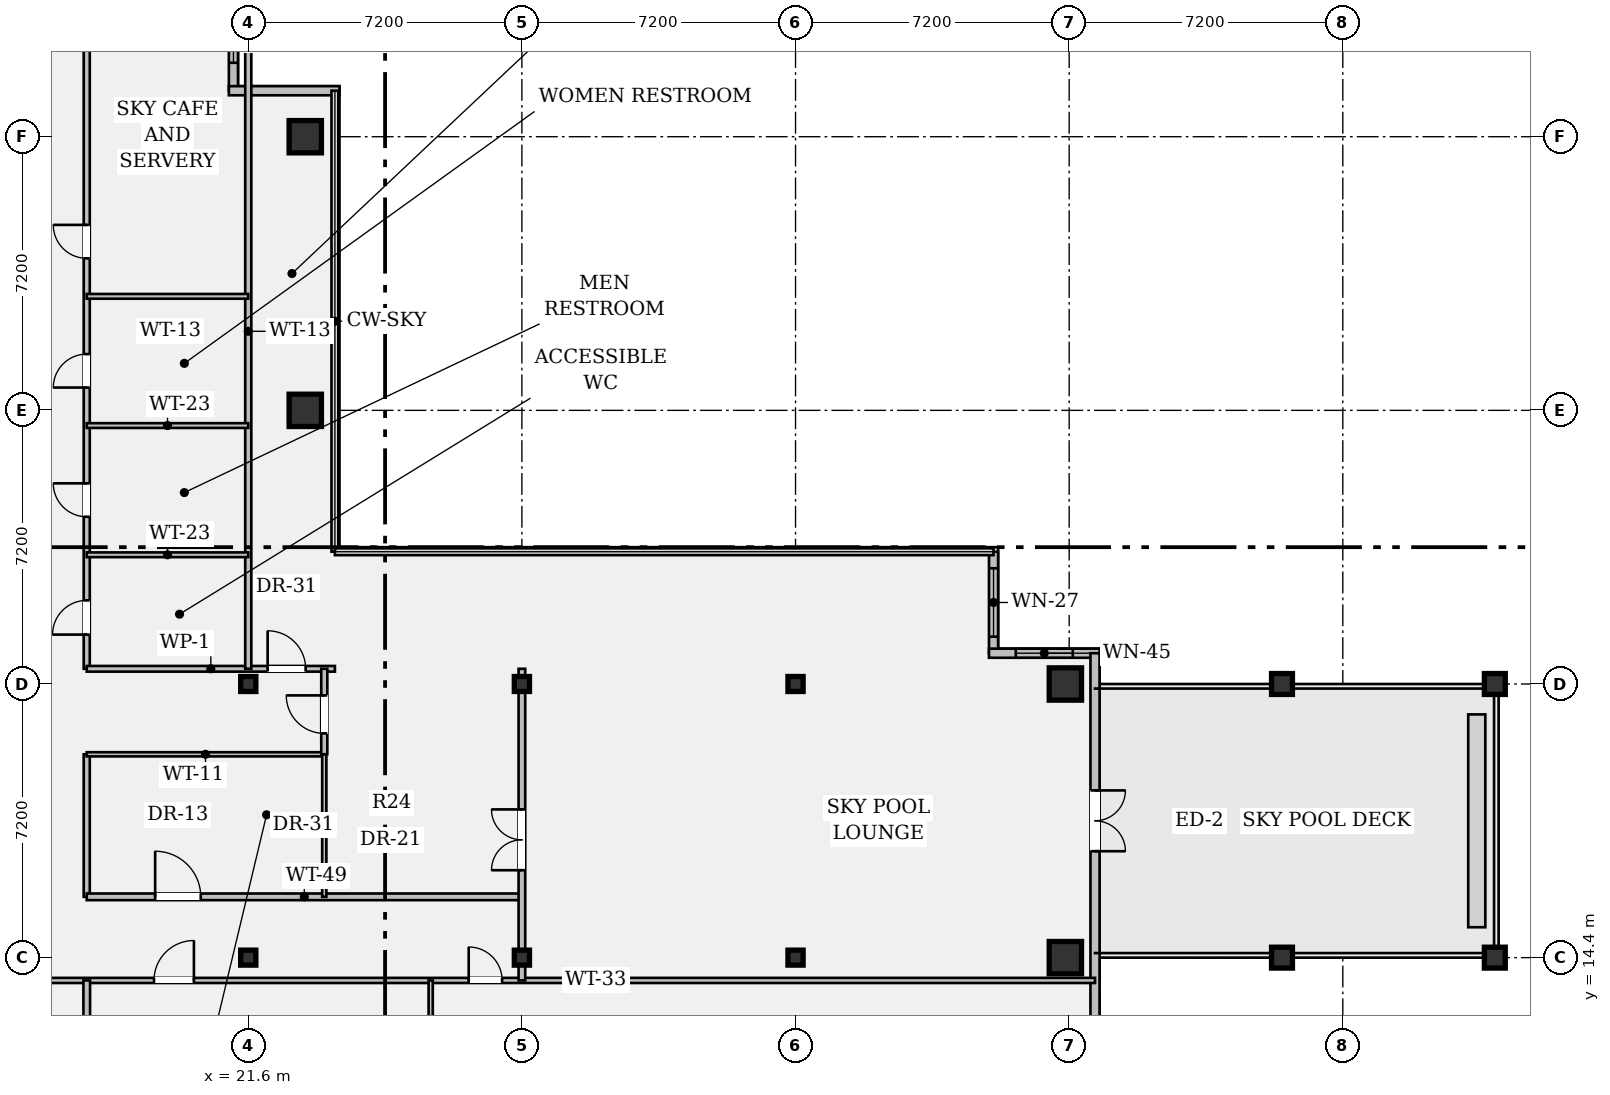
"""IFC4 building model, lengths in metres.
Left out: names, types, materials, properties, quantities, classifications, styles, units other than length and angle.
Written with IfcOpenShell. Run it as: python <this file> out.ifc"""

import sys

from ifc_helpers import new_model, si_unit, direction, frame, frame_2d, origin, origin_2d, place, context, subcontext, project, spatial, rectangle, hollow_rectangle, i_section, extrude, element, fill, save


model = new_model("IFC4")
c1 = context("Model", 3, precision=1e-05, world=origin(), true_north=direction((0.0, 1.0)))
c2 = subcontext(c1, "Body", "Model", "MODEL_VIEW")
j1 = project(units=[si_unit("LENGTHUNIT", "METRE"), si_unit("PLANEANGLEUNIT", "RADIAN")], contexts=[c1])
p1 = place(None, origin())
s1 = spatial("IfcSite", under=j1, at=p1, CompositionType="ELEMENT")
p2 = place(p1, origin())
s2 = spatial("IfcBuilding", under=s1, at=p2, CompositionType="ELEMENT")
p3 = place(p2, frame((0.0, 0.0, 168.7)))
s3 = spatial("IfcBuildingStorey", under=s2, at=p3, CompositionType="ELEMENT", Elevation=168.7)
for number, where, z_axis, x_axis in (
    (1, (21.6, 14.4, 0.0), (0.0, 0.0, 1.0), (1.0, 0.0, 0.0)),
    (2, (21.6, 21.6, 0.0), (0.0, 0.0, 1.0), (1.0, 0.0, 0.0)),
):
    element("IfcColumn", number, at=place(p3, frame(where, z_axis=z_axis, x_axis=x_axis)), inside=s3, PredefinedType="COLUMN", context=c2, shape_type="SweptSolid", body=[
        extrude(i_section(OverallWidth=0.399, OverallDepth=0.394, WebThickness=0.023, FlangeThickness=0.037, FilletRadius=0.018, at=origin_2d()), origin(), (0.0, 0.0, 1.0), 4.29),
    ])
for number, where, z_axis, x_axis in (
    (3, (23.1, 28.8, 0.0), (0.0, 0.0, 1.0), (1.0, 0.0, 0.0)),
    (4, (23.1, 36.0, 0.0), (0.0, 0.0, 1.0), (1.0, 0.0, 0.0)),
):
    element("IfcColumn", number, at=place(p3, frame(where, z_axis=z_axis, x_axis=x_axis)), inside=s3, PredefinedType="COLUMN", context=c2, shape_type="SweptSolid", body=[
        extrude(hollow_rectangle(XDim=0.85, YDim=0.85, WallThickness=0.05, at=origin_2d()), origin(), (0.0, 0.0, 1.0), 4.29),
    ])
for number, where, z_axis, x_axis in (
    (5, (28.8, 14.4, 0.0), (0.0, 0.0, 1.0), (1.0, 0.0, 0.0)),
    (6, (28.8, 21.6, 0.0), (0.0, 0.0, 1.0), (1.0, 0.0, 0.0)),
    (7, (36.0, 14.4, 0.0), (0.0, 0.0, 1.0), (1.0, 0.0, 0.0)),
    (8, (36.0, 21.6, 0.0), (0.0, 0.0, 1.0), (1.0, 0.0, 0.0)),
):
    element("IfcColumn", number, at=place(p3, frame(where, z_axis=z_axis, x_axis=x_axis)), inside=s3, PredefinedType="COLUMN", context=c2, shape_type="SweptSolid", body=[
        extrude(i_section(OverallWidth=0.399, OverallDepth=0.394, WebThickness=0.023, FlangeThickness=0.037, FilletRadius=0.018, at=origin_2d()), origin(), (0.0, 0.0, 1.0), 4.29),
    ])
for number, where, z_axis, x_axis in (
    (9, (43.1, 14.4, 0.0), (0.0, 0.0, 1.0), (1.0, 0.0, 0.0)),
    (10, (43.1, 21.6, 0.0), (0.0, 0.0, 1.0), (1.0, 0.0, 0.0)),
):
    element("IfcColumn", number, at=place(p3, frame(where, z_axis=z_axis, x_axis=x_axis)), inside=s3, PredefinedType="COLUMN", context=c2, shape_type="SweptSolid", body=[
        extrude(hollow_rectangle(XDim=0.85, YDim=0.85, WallThickness=0.05, at=origin_2d()), origin(), (0.0, 0.0, 1.0), 4.29),
    ])
for number, where, z_axis, x_axis in (
    (11, (48.8, 14.4, -0.345), (0.0, 0.0, 1.0), (1.0, 0.0, 0.0)),
    (12, (54.4, 14.4, -0.345), (0.0, 0.0, 1.0), (1.0, 0.0, 0.0)),
    (13, (48.8, 21.6, -0.345), (0.0, 0.0, 1.0), (1.0, 0.0, 0.0)),
    (14, (54.4, 21.6, -0.345), (0.0, 0.0, 1.0), (1.0, 0.0, 0.0)),
):
    element("IfcColumn", number, at=place(p3, frame(where, z_axis=z_axis, x_axis=x_axis)), inside=s3, PredefinedType="COLUMN", context=c2, shape_type="SweptSolid", body=[
        extrude(hollow_rectangle(XDim=0.55, YDim=0.55, WallThickness=0.035, at=origin_2d()), origin(), (0.0, 0.0, 1.0), 3.23),
    ])
p4 = place(p3, frame((21.21, 39.88, 0.0), z_axis=(0.0, 0.0, 1.0), x_axis=(0.0, -1.0, 0.0)))
e15 = element("IfcWall", 15, at=p4, inside=s3, PredefinedType="STANDARD", context=c2, shape_type="SweptSolid", body=[
    extrude(rectangle(XDim=2.67, YDim=0.24, at=frame_2d((1.335, 0.0))), origin(), (0.0, 0.0, 1.0), 4.29),
])
p5 = place(p4, frame((0.735, 0.0, 0.95)))
e16 = element("IfcOpeningElement", 16, at=p5, cuts=e15, PredefinedType="OPENING", context=c2, shape_type="SweptSolid", body=[
    extrude(rectangle(XDim=1.2, YDim=1.8, at=frame_2d((0.6, 0.9))), frame((0.0, 0.132, 0.0), z_axis=(0.0, -1.0, 0.0), x_axis=(1.0, 0.0, 0.0)), (0.0, 0.0, 1.0), 0.264),
])
p6 = place(p3, frame((21.09, 37.21, 0.0), z_axis=(0.0, 0.0, 1.0), x_axis=(1.0, 0.0, 0.0)))
e17 = element("IfcWall", 17, at=p6, inside=s3, PredefinedType="STANDARD", context=c2, shape_type="SweptSolid", body=[
    extrude(rectangle(XDim=2.91, YDim=0.24, at=frame_2d((1.455, 0.0))), origin(), (0.0, 0.0, 1.0), 4.29),
])
p7 = place(p3, frame((41.21, 25.08, 0.0), z_axis=(0.0, 0.0, 1.0), x_axis=(0.0, -1.0, 0.0)))
e18 = element("IfcWall", 18, at=p7, inside=s3, PredefinedType="STANDARD", context=c2, shape_type="SweptSolid", body=[
    extrude(rectangle(XDim=2.67, YDim=0.24, at=frame_2d((1.335, 0.0))), origin(), (0.0, 0.0, 1.0), 4.29),
])
p8 = place(p7, frame((0.435, 0.0, 0.95)))
e19 = element("IfcOpeningElement", 19, at=p8, cuts=e18, PredefinedType="OPENING", context=c2, shape_type="SweptSolid", body=[
    extrude(rectangle(XDim=1.8, YDim=1.35, at=frame_2d((0.9, 0.675))), frame((0.0, 0.132, 0.0), z_axis=(0.0, -1.0, 0.0), x_axis=(1.0, 0.0, 0.0)), (0.0, 0.0, 1.0), 0.264),
])
p9 = place(p3, frame((41.09, 22.41, 0.0), z_axis=(0.0, 0.0, 1.0), x_axis=(1.0, 0.0, 0.0)))
e20 = element("IfcWall", 20, at=p9, inside=s3, PredefinedType="STANDARD", context=c2, shape_type="SweptSolid", body=[
    extrude(rectangle(XDim=2.91, YDim=0.24, at=frame_2d((1.455, 0.0))), origin(), (0.0, 0.0, 1.0), 4.29),
])
p10 = place(p9, frame((0.705, 0.0, 0.95)))
e21 = element("IfcOpeningElement", 21, at=p10, cuts=e20, PredefinedType="OPENING", context=c2, shape_type="SweptSolid", body=[
    extrude(rectangle(XDim=1.5, YDim=1.8, at=frame_2d((0.75, 0.9))), frame((0.0, 0.132, 0.0), z_axis=(0.0, -1.0, 0.0), x_axis=(1.0, 0.0, 0.0)), (0.0, 0.0, 1.0), 0.264),
])
p11 = place(p3, frame((43.88, 22.41, 0.0), z_axis=(0.0, 0.0, 1.0), x_axis=(0.0, -1.0, 0.0)))
e22 = element("IfcWall", 22, at=p11, inside=s3, PredefinedType="STANDARD", context=c2, shape_type="SweptSolid", body=[
    extrude(rectangle(XDim=16.42, YDim=0.24, at=frame_2d((8.21, 0.0))), origin(), (0.0, 0.0, 1.0), 2.875),
])
p12 = place(p11, frame((3.61, 0.0, 0.0)))
e23 = element("IfcOpeningElement", 23, at=p12, cuts=e22, PredefinedType="OPENING", context=c2, shape_type="SweptSolid", body=[
    extrude(rectangle(XDim=1.6, YDim=2.2, at=frame_2d((0.8, 1.1))), frame((0.0, 0.132, 0.0), z_axis=(0.0, -1.0, 0.0), x_axis=(1.0, 0.0, 0.0)), (0.0, 0.0, 1.0), 0.264),
])
p13 = place(p3, frame((17.35, 22.0, 0.0), z_axis=(0.0, 0.0, 1.0), x_axis=(0.0, 1.0, 0.0)))
e24 = element("IfcWall", 24, at=p13, inside=s3, PredefinedType="PARTITIONING", context=c2, shape_type="SweptSolid", body=[
    extrude(rectangle(XDim=17.76, YDim=0.16, at=frame_2d((8.88, 0.0))), origin(), (0.0, 0.0, 1.0), 3.653),
])
p14 = place(p13, frame((0.9, 0.0, 0.0)))
e25 = element("IfcOpeningElement", 25, at=p14, cuts=e24, PredefinedType="OPENING", context=c2, shape_type="SweptSolid", body=[
    extrude(rectangle(XDim=0.9, YDim=2.15, at=frame_2d((0.45, 1.075))), frame((0.0, 0.092, 0.0), z_axis=(0.0, -1.0, 0.0), x_axis=(1.0, 0.0, 0.0)), (0.0, 0.0, 1.0), 0.184),
])
p15 = place(p13, frame((4.0, 0.0, 0.0)))
e26 = element("IfcOpeningElement", 26, at=p15, cuts=e24, PredefinedType="OPENING", context=c2, shape_type="SweptSolid", body=[
    extrude(rectangle(XDim=0.88, YDim=2.15, at=frame_2d((0.44, 1.075))), frame((0.0, 0.092, 0.0), z_axis=(0.0, -1.0, 0.0), x_axis=(1.0, 0.0, 0.0)), (0.0, 0.0, 1.0), 0.184),
])
p16 = place(p13, frame((7.4, 0.0, 0.0)))
e27 = element("IfcOpeningElement", 27, at=p16, cuts=e24, PredefinedType="OPENING", context=c2, shape_type="SweptSolid", body=[
    extrude(rectangle(XDim=0.88, YDim=2.15, at=frame_2d((0.44, 1.075))), frame((0.0, 0.092, 0.0), z_axis=(0.0, -1.0, 0.0), x_axis=(1.0, 0.0, 0.0)), (0.0, 0.0, 1.0), 0.184),
])
p17 = place(p13, frame((10.8, 0.0, 0.0)))
e28 = element("IfcOpeningElement", 28, at=p17, cuts=e24, PredefinedType="OPENING", context=c2, shape_type="SweptSolid", body=[
    extrude(rectangle(XDim=0.88, YDim=2.15, at=frame_2d((0.44, 1.075))), frame((0.0, 0.092, 0.0), z_axis=(0.0, -1.0, 0.0), x_axis=(1.0, 0.0, 0.0)), (0.0, 0.0, 1.0), 0.184),
])
p18 = place(p3, frame((17.35, 22.0, 0.0), z_axis=(0.0, 0.0, 1.0), x_axis=(1.0, 0.0, 0.0)))
e29 = element("IfcWall", 29, at=p18, inside=s3, PredefinedType="PARTITIONING", context=c2, shape_type="SweptSolid", body=[
    extrude(rectangle(XDim=6.53, YDim=0.15, at=frame_2d((3.265, 0.0))), origin(), (0.0, 0.0, 1.0), 3.858),
])
p19 = place(p18, frame((4.76, 0.0, 0.0)))
e30 = element("IfcOpeningElement", 30, at=p19, cuts=e29, PredefinedType="OPENING", context=c2, shape_type="SweptSolid", body=[
    extrude(rectangle(XDim=1.0, YDim=2.15, at=frame_2d((0.5, 1.075))), frame((0.0, 0.087, 0.0), z_axis=(0.0, -1.0, 0.0), x_axis=(1.0, 0.0, 0.0)), (0.0, 0.0, 1.0), 0.174),
])
p20 = place(p3, frame((14.4, 13.8, 0.0), z_axis=(0.0, 0.0, 1.0), x_axis=(1.0, 0.0, 0.0)))
e31 = element("IfcWall", 31, at=p20, inside=s3, PredefinedType="PARTITIONING", context=c2, shape_type="SweptSolid", body=[
    extrude(rectangle(XDim=29.48, YDim=0.135, at=frame_2d((14.74, 0.0))), origin(), (0.0, 0.0, 1.0), 3.653),
])
p21 = place(p20, frame((4.72, 0.0, 0.0)))
e32 = element("IfcOpeningElement", 32, at=p21, cuts=e31, PredefinedType="OPENING", context=c2, shape_type="SweptSolid", body=[
    extrude(rectangle(XDim=1.05, YDim=2.15, at=frame_2d((0.525, 1.075))), frame((0.0, 0.08, 0.0), z_axis=(0.0, -1.0, 0.0), x_axis=(1.0, 0.0, 0.0)), (0.0, 0.0, 1.0), 0.159),
])
p22 = place(p20, frame((13.0, 0.0, 0.0)))
e33 = element("IfcOpeningElement", 33, at=p22, cuts=e31, PredefinedType="OPENING", context=c2, shape_type="SweptSolid", body=[
    extrude(rectangle(XDim=0.88, YDim=2.15, at=frame_2d((0.44, 1.075))), frame((0.0, 0.08, 0.0), z_axis=(0.0, -1.0, 0.0), x_axis=(1.0, 0.0, 0.0)), (0.0, 0.0, 1.0), 0.159),
])
p23 = place(p3, frame((26.4, 3.32, 0.0), z_axis=(0.0, 0.0, 1.0), x_axis=(0.0, 1.0, 0.0)))
e34 = element("IfcWall", 34, at=p23, inside=s3, PredefinedType="PARTITIONING", context=c2, shape_type="SweptSolid", body=[
    extrude(rectangle(XDim=10.48, YDim=0.11, at=frame_2d((5.24, 0.0))), origin(), (0.0, 0.0, 1.0), 3.653),
])
p24 = place(p3, frame((21.6, 22.0, 0.0), z_axis=(0.0, 0.0, 1.0), x_axis=(0.0, 1.0, 0.0)))
e35 = element("IfcWall", 35, at=p24, inside=s3, PredefinedType="PARTITIONING", context=c2, shape_type="SweptSolid", body=[
    extrude(rectangle(XDim=17.76, YDim=0.16, at=frame_2d((8.88, 0.0))), origin(), (0.0, 0.0, 1.0), 3.653),
])
for number, where, z_axis, x_axis in (
    (36, (17.35, 25.0, 0.0), (0.0, 0.0, 1.0), (1.0, 0.0, 0.0)),
    (37, (17.35, 28.4, 0.0), (0.0, 0.0, 1.0), (1.0, 0.0, 0.0)),
    (38, (17.35, 31.8, 0.0), (0.0, 0.0, 1.0), (1.0, 0.0, 0.0)),
):
    element("IfcWall", number, at=place(p3, frame(where, z_axis=z_axis, x_axis=x_axis)), inside=s3, PredefinedType="PARTITIONING", context=c2, shape_type="SweptSolid", body=[
        extrude(rectangle(XDim=4.25, YDim=0.125, at=frame_2d((2.125, 0.0))), origin(), (0.0, 0.0, 1.0), 3.858),
    ])
p25 = place(p3, frame((17.35, 16.0, 0.0), z_axis=(0.0, 0.0, 1.0), x_axis=(0.0, 1.0, 0.0)))
e39 = element("IfcWall", 39, at=p25, inside=s3, PredefinedType="PARTITIONING", context=c2, shape_type="SweptSolid", body=[
    extrude(rectangle(XDim=3.75, YDim=0.16, at=frame_2d((1.875, 0.0))), origin(), (0.0, 0.0, 1.0), 4.29),
])
p26 = place(p3, frame((17.35, 8.0, 0.0), z_axis=(0.0, 0.0, 1.0), x_axis=(0.0, 1.0, 0.0)))
e40 = element("IfcWall", 40, at=p26, inside=s3, PredefinedType="PARTITIONING", context=c2, shape_type="SweptSolid", body=[
    extrude(rectangle(XDim=5.8, YDim=0.175, at=frame_2d((2.9, 0.0))), origin(), (0.0, 0.0, 1.0), 4.29),
])
p27 = place(p3, frame((17.35, 16.0, 0.0), z_axis=(0.0, 0.0, 1.0), x_axis=(1.0, 0.0, 0.0)))
e41 = element("IfcWall", 41, at=p27, inside=s3, PredefinedType="PARTITIONING", context=c2, shape_type="SweptSolid", body=[
    extrude(rectangle(XDim=11.45, YDim=0.175, at=frame_2d((5.725, 0.0))), origin(), (0.0, 0.0, 1.0), 3.653),
])
p28 = place(p27, frame((1.8, 0.0, 0.0)))
e42 = element("IfcOpeningElement", 42, at=p28, cuts=e41, PredefinedType="OPENING", context=c2, shape_type="SweptSolid", body=[
    extrude(rectangle(XDim=1.2, YDim=2.15, at=frame_2d((0.6, 1.075))), frame((0.0, 0.1, 0.0), z_axis=(0.0, -1.0, 0.0), x_axis=(1.0, 0.0, 0.0)), (0.0, 0.0, 1.0), 0.199),
])
p29 = place(p3, frame((17.35, 19.75, 0.0), z_axis=(0.0, 0.0, 1.0), x_axis=(1.0, 0.0, 0.0)))
e43 = element("IfcWall", 43, at=p29, inside=s3, PredefinedType="PARTITIONING", context=c2, shape_type="SweptSolid", body=[
    extrude(rectangle(XDim=6.25, YDim=0.11, at=frame_2d((3.125, 0.0))), origin(), (0.0, 0.0, 1.0), 3.653),
])
p30 = place(p3, frame((23.6, 19.75, 0.0), z_axis=(0.0, 0.0, 1.0), x_axis=(0.0, 1.0, 0.0)))
e44 = element("IfcWall", 44, at=p30, inside=s3, PredefinedType="PARTITIONING", context=c2, shape_type="SweptSolid", body=[
    extrude(rectangle(XDim=2.25, YDim=0.16, at=frame_2d((1.125, 0.0))), origin(), (0.0, 0.0, 1.0), 3.653),
])
p31 = place(p30, frame((0.55, 0.0, 0.0)))
e45 = element("IfcOpeningElement", 45, at=p31, cuts=e44, PredefinedType="OPENING", context=c2, shape_type="SweptSolid", body=[
    extrude(rectangle(XDim=1.0, YDim=2.15, at=frame_2d((0.5, 1.075))), frame((0.0, 0.092, 0.0), z_axis=(0.0, -1.0, 0.0), x_axis=(1.0, 0.0, 0.0)), (0.0, 0.0, 1.0), 0.184),
])
p32 = place(p3, frame((28.8, 13.8, 0.0), z_axis=(0.0, 0.0, 1.0), x_axis=(0.0, 1.0, 0.0)))
e46 = element("IfcWall", 46, at=p32, inside=s3, PredefinedType="PARTITIONING", context=c2, shape_type="SweptSolid", body=[
    extrude(rectangle(XDim=8.2, YDim=0.175, at=frame_2d((4.1, 0.0))), origin(), (0.0, 0.0, 1.0), 3.653),
])
p33 = place(p32, frame((2.9, 0.0, 0.0)))
e47 = element("IfcOpeningElement", 47, at=p33, cuts=e46, PredefinedType="OPENING", context=c2, shape_type="SweptSolid", body=[
    extrude(rectangle(XDim=1.6, YDim=2.2, at=frame_2d((0.8, 1.1))), frame((0.0, 0.1, 0.0), z_axis=(0.0, -1.0, 0.0), x_axis=(1.0, 0.0, 0.0)), (0.0, 0.0, 1.0), 0.199),
])
p34 = place(p3, frame((23.6, 16.0, 0.0), z_axis=(0.0, 0.0, 1.0), x_axis=(0.0, 1.0, 0.0)))
e48 = element("IfcWall", 48, at=p34, inside=s3, PredefinedType="PARTITIONING", context=c2, shape_type="SweptSolid", body=[
    extrude(rectangle(XDim=3.75, YDim=0.11, at=frame_2d((1.875, 0.0))), origin(), (0.0, 0.0, 1.0), 4.29),
])
p35 = place(p5, origin())
e49 = element("IfcWindow", 49, at=p35, inside=s3, PartitioningType="SINGLE_PANEL", PredefinedType="WINDOW", context=c2, shape_type="SweptSolid", body=[
    extrude(rectangle(XDim=1.2, YDim=1.8, at=frame_2d((0.6, 0.9))), frame((0.0, 0.03, 0.0), z_axis=(0.0, -1.0, 0.0), x_axis=(1.0, 0.0, 0.0)), (0.0, 0.0, 1.0), 0.06),
])
fill(e16, e49)
p36 = place(p8, origin())
e50 = element("IfcWindow", 50, at=p36, inside=s3, PartitioningType="SINGLE_PANEL", PredefinedType="WINDOW", context=c2, shape_type="SweptSolid", body=[
    extrude(rectangle(XDim=1.8, YDim=1.35, at=frame_2d((0.9, 0.675))), frame((0.0, 0.03, 0.0), z_axis=(0.0, -1.0, 0.0), x_axis=(1.0, 0.0, 0.0)), (0.0, 0.0, 1.0), 0.06),
])
fill(e19, e50)
p37 = place(p10, origin())
e51 = element("IfcWindow", 51, at=p37, inside=s3, PartitioningType="SINGLE_PANEL", PredefinedType="WINDOW", context=c2, shape_type="SweptSolid", body=[
    extrude(rectangle(XDim=1.5, YDim=1.8, at=frame_2d((0.75, 0.9))), frame((0.0, 0.03, 0.0), z_axis=(0.0, -1.0, 0.0), x_axis=(1.0, 0.0, 0.0)), (0.0, 0.0, 1.0), 0.06),
])
fill(e21, e51)
p38 = place(p12, origin())
e52 = element("IfcDoor", 52, at=p38, inside=s3, OperationType="DOUBLE_DOOR_SINGLE_SWING", PredefinedType="DOOR", context=c2, shape_type="SweptSolid", body=[
    extrude(rectangle(XDim=1.6, YDim=2.2, at=frame_2d((0.8, 1.1))), frame((0.0, 0.025, 0.0), z_axis=(0.0, -1.0, 0.0), x_axis=(1.0, 0.0, 0.0)), (0.0, 0.0, 1.0), 0.05),
])
fill(e23, e52)
p39 = place(p28, origin())
e53 = element("IfcDoor", 53, at=p39, inside=s3, OperationType="SINGLE_SWING_LEFT", PredefinedType="DOOR", context=c2, shape_type="SweptSolid", body=[
    extrude(rectangle(XDim=1.2, YDim=2.15, at=frame_2d((0.6, 1.075))), frame((0.0, 0.025, 0.0), z_axis=(0.0, -1.0, 0.0), x_axis=(1.0, 0.0, 0.0)), (0.0, 0.0, 1.0), 0.05),
])
fill(e42, e53)
p40 = place(p31, origin())
e54 = element("IfcDoor", 54, at=p40, inside=s3, OperationType="SINGLE_SWING_RIGHT", PredefinedType="DOOR", context=c2, shape_type="SweptSolid", body=[
    extrude(rectangle(XDim=1.0, YDim=2.15, at=frame_2d((0.5, 1.075))), frame((0.0, 0.025, 0.0), z_axis=(0.0, -1.0, 0.0), x_axis=(1.0, 0.0, 0.0)), (0.0, 0.0, 1.0), 0.05),
])
fill(e45, e54)
p41 = place(p33, origin())
e55 = element("IfcDoor", 55, at=p41, inside=s3, OperationType="DOUBLE_DOOR_SINGLE_SWING", PredefinedType="DOOR", context=c2, shape_type="SweptSolid", body=[
    extrude(rectangle(XDim=1.6, YDim=2.2, at=frame_2d((0.8, 1.1))), frame((0.0, 0.025, 0.0), z_axis=(0.0, -1.0, 0.0), x_axis=(1.0, 0.0, 0.0)), (0.0, 0.0, 1.0), 0.05),
])
fill(e47, e55)
p42 = place(p14, origin())
e56 = element("IfcDoor", 56, at=p42, inside=s3, OperationType="SINGLE_SWING_LEFT", PredefinedType="DOOR", context=c2, shape_type="SweptSolid", body=[
    extrude(rectangle(XDim=0.9, YDim=2.15, at=frame_2d((0.45, 1.075))), frame((0.0, 0.025, 0.0), z_axis=(0.0, -1.0, 0.0), x_axis=(1.0, 0.0, 0.0)), (0.0, 0.0, 1.0), 0.05),
])
fill(e25, e56)
p43 = place(p15, origin())
e57 = element("IfcDoor", 57, at=p43, inside=s3, OperationType="SINGLE_SWING_RIGHT", PredefinedType="DOOR", context=c2, shape_type="SweptSolid", body=[
    extrude(rectangle(XDim=0.88, YDim=2.15, at=frame_2d((0.44, 1.075))), frame((0.0, 0.025, 0.0), z_axis=(0.0, -1.0, 0.0), x_axis=(1.0, 0.0, 0.0)), (0.0, 0.0, 1.0), 0.05),
])
fill(e26, e57)
p44 = place(p16, origin())
e58 = element("IfcDoor", 58, at=p44, inside=s3, OperationType="SINGLE_SWING_LEFT", PredefinedType="DOOR", context=c2, shape_type="SweptSolid", body=[
    extrude(rectangle(XDim=0.88, YDim=2.15, at=frame_2d((0.44, 1.075))), frame((0.0, 0.025, 0.0), z_axis=(0.0, -1.0, 0.0), x_axis=(1.0, 0.0, 0.0)), (0.0, 0.0, 1.0), 0.05),
])
fill(e27, e58)
p45 = place(p17, origin())
e59 = element("IfcDoor", 59, at=p45, inside=s3, OperationType="SINGLE_SWING_RIGHT", PredefinedType="DOOR", context=c2, shape_type="SweptSolid", body=[
    extrude(rectangle(XDim=0.88, YDim=2.15, at=frame_2d((0.44, 1.075))), frame((0.0, 0.025, 0.0), z_axis=(0.0, -1.0, 0.0), x_axis=(1.0, 0.0, 0.0)), (0.0, 0.0, 1.0), 0.05),
])
fill(e28, e59)
p46 = place(p19, origin())
e60 = element("IfcDoor", 60, at=p46, inside=s3, OperationType="SINGLE_SWING_LEFT", PredefinedType="DOOR", context=c2, shape_type="SweptSolid", body=[
    extrude(rectangle(XDim=1.0, YDim=2.15, at=frame_2d((0.5, 1.075))), frame((0.0, 0.025, 0.0), z_axis=(0.0, -1.0, 0.0), x_axis=(1.0, 0.0, 0.0)), (0.0, 0.0, 1.0), 0.05),
])
fill(e30, e60)
p47 = place(p21, origin())
e61 = element("IfcDoor", 61, at=p47, inside=s3, OperationType="SINGLE_SWING_RIGHT", PredefinedType="DOOR", context=c2, shape_type="SweptSolid", body=[
    extrude(rectangle(XDim=1.05, YDim=2.15, at=frame_2d((0.525, 1.075))), frame((0.0, 0.025, 0.0), z_axis=(0.0, -1.0, 0.0), x_axis=(1.0, 0.0, 0.0)), (0.0, 0.0, 1.0), 0.05),
])
fill(e32, e61)
p48 = place(p22, origin())
e62 = element("IfcDoor", 62, at=p48, inside=s3, OperationType="SINGLE_SWING_LEFT", PredefinedType="DOOR", context=c2, shape_type="SweptSolid", body=[
    extrude(rectangle(XDim=0.88, YDim=2.15, at=frame_2d((0.44, 1.075))), frame((0.0, 0.025, 0.0), z_axis=(0.0, -1.0, 0.0), x_axis=(1.0, 0.0, 0.0)), (0.0, 0.0, 1.0), 0.05),
])
fill(e33, e62)
save(model, sys.argv[1])
